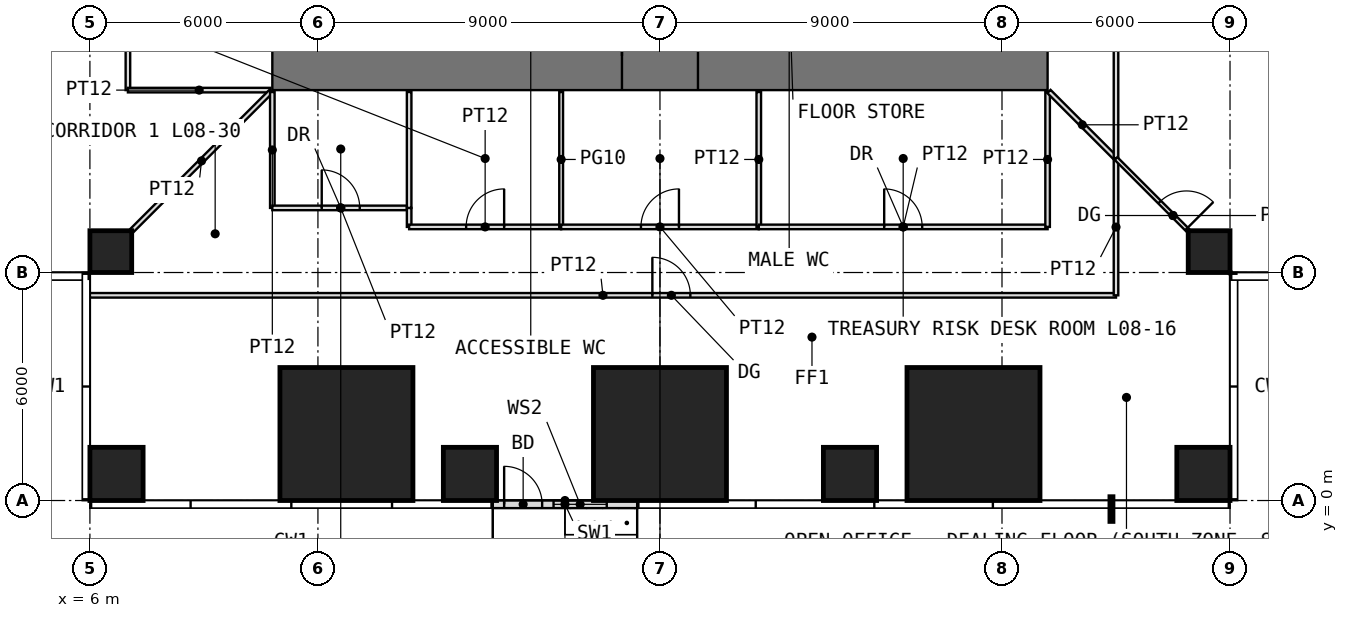
"""IFC4 building model, lengths in metres.
Left out: names, types, materials, properties, quantities, classifications, styles, units other than length and angle.
Written with IfcOpenShell. Run it as: python <this file> out.ifc"""

import sys

from ifc_helpers import new_model, si_unit, direction, frame, frame_2d, origin, origin_2d, place, context, subcontext, project, spatial, rectangle, extrude, element, fill, save


model = new_model("IFC4")
c1 = context("Model", 3, precision=1e-05, world=origin(), true_north=direction((0.0, 1.0)))
c2 = subcontext(c1, "Body", "Model", "MODEL_VIEW")
j1 = project(units=[si_unit("LENGTHUNIT", "METRE"), si_unit("PLANEANGLEUNIT", "RADIAN")], contexts=[c1])
p1 = place(None, origin())
s1 = spatial("IfcSite", under=j1, at=p1, CompositionType="ELEMENT")
p2 = place(p1, origin())
s2 = spatial("IfcBuilding", under=s1, at=p2, CompositionType="ELEMENT")
p3 = place(p2, frame((0.0, 0.0, 38.5)))
s3 = spatial("IfcBuildingStorey", under=s2, at=p3, CompositionType="ELEMENT", Elevation=38.5)
p4 = place(p3, frame((6.7, 0.7, 0.0), z_axis=(0.0, 0.0, 1.0), x_axis=(1.0, 0.0, 0.0)))
e1 = element("IfcColumn", 1, at=p4, inside=s3, PredefinedType="COLUMN", context=c2, shape_type="SweptSolid", body=[
    extrude(rectangle(XDim=1.4, YDim=1.4, at=origin_2d()), origin(), (0.0, 0.0, 1.0), 4.0),
])
p5 = place(p3, frame((12.75, 1.75, 0.0), z_axis=(0.0, 0.0, 1.0), x_axis=(1.0, 0.0, 0.0)))
e2 = element("IfcColumn", 2, at=p5, inside=s3, PredefinedType="COLUMN", context=c2, shape_type="SweptSolid", body=[
    extrude(rectangle(XDim=3.5, YDim=3.5, at=origin_2d()), origin(), (0.0, 0.0, 1.0), 4.0),
])
p6 = place(p3, frame((16.0, 0.7, 0.0), z_axis=(0.0, 0.0, 1.0), x_axis=(1.0, 0.0, 0.0)))
e3 = element("IfcColumn", 3, at=p6, inside=s3, PredefinedType="COLUMN", context=c2, shape_type="SweptSolid", body=[
    extrude(rectangle(XDim=1.4, YDim=1.4, at=origin_2d()), origin(), (0.0, 0.0, 1.0), 4.0),
])
p7 = place(p3, frame((21.0, 1.75, 0.0), z_axis=(0.0, 0.0, 1.0), x_axis=(1.0, 0.0, 0.0)))
e4 = element("IfcColumn", 4, at=p7, inside=s3, PredefinedType="COLUMN", context=c2, shape_type="SweptSolid", body=[
    extrude(rectangle(XDim=3.5, YDim=3.5, at=origin_2d()), origin(), (0.0, 0.0, 1.0), 4.0),
])
p8 = place(p3, frame((26.0, 0.7, 0.0), z_axis=(0.0, 0.0, 1.0), x_axis=(1.0, 0.0, 0.0)))
e5 = element("IfcColumn", 5, at=p8, inside=s3, PredefinedType="COLUMN", context=c2, shape_type="SweptSolid", body=[
    extrude(rectangle(XDim=1.4, YDim=1.4, at=origin_2d()), origin(), (0.0, 0.0, 1.0), 4.0),
])
p9 = place(p3, frame((29.25, 1.75, 0.0), z_axis=(0.0, 0.0, 1.0), x_axis=(1.0, 0.0, 0.0)))
e6 = element("IfcColumn", 6, at=p9, inside=s3, PredefinedType="COLUMN", context=c2, shape_type="SweptSolid", body=[
    extrude(rectangle(XDim=3.5, YDim=3.5, at=origin_2d()), origin(), (0.0, 0.0, 1.0), 4.0),
])
p10 = place(p3, frame((35.3, 0.7, 0.0), z_axis=(0.0, 0.0, 1.0), x_axis=(1.0, 0.0, 0.0)))
e7 = element("IfcColumn", 7, at=p10, inside=s3, PredefinedType="COLUMN", context=c2, shape_type="SweptSolid", body=[
    extrude(rectangle(XDim=1.4, YDim=1.4, at=origin_2d()), origin(), (0.0, 0.0, 1.0), 4.0),
])
for number, where, z_axis, x_axis in (
    (8, (6.55, 6.55, 0.0), (0.0, 0.0, 1.0), (1.0, 0.0, 0.0)),
    (9, (35.45, 6.55, 0.0), (0.0, 0.0, 1.0), (1.0, 0.0, 0.0)),
):
    element("IfcColumn", number, at=place(p3, frame(where, z_axis=z_axis, x_axis=x_axis)), inside=s3, PredefinedType="COLUMN", context=c2, shape_type="SweptSolid", body=[
        extrude(rectangle(XDim=1.1, YDim=1.1, at=origin_2d()), origin(), (0.0, 0.0, 1.0), 4.0),
    ])
p11 = place(p3, frame((16.6, -0.1, 0.0), z_axis=(0.0, 0.0, 1.0), x_axis=(1.0, 0.0, 0.0)))
e10 = element("IfcWall", 10, at=p11, inside=s3, PredefinedType="USERDEFINED", context=c2, shape_type="SweptSolid", body=[
    extrude(rectangle(XDim=3.8, YDim=0.2, at=frame_2d((1.9, 0.0))), origin(), (0.0, 0.0, 1.0), 3.75),
])
p12 = place(p11, frame((0.3, 0.0, 0.0)))
e11 = element("IfcOpeningElement", 11, at=p12, cuts=e10, PredefinedType="OPENING", context=c2, shape_type="SweptSolid", body=[
    extrude(rectangle(XDim=1.0, YDim=2.4, at=frame_2d((0.5, 1.2))), frame((0.0, 0.11, 0.0), z_axis=(0.0, -1.0, 0.0), x_axis=(1.0, 0.0, 0.0)), (0.0, 0.0, 1.0), 0.22),
])
p13 = place(p11, frame((1.6, 0.0, 0.3)))
e12 = element("IfcOpeningElement", 12, at=p13, cuts=e10, PredefinedType="OPENING", context=c2, shape_type="SweptSolid", body=[
    extrude(rectangle(XDim=1.4, YDim=2.7, at=frame_2d((0.7, 1.35))), frame((0.0, 0.11, 0.0), z_axis=(0.0, -1.0, 0.0), x_axis=(1.0, 0.0, 0.0)), (0.0, 0.0, 1.0), 0.22),
])
p14 = place(p3, frame((10.8, 11.7, -0.05), z_axis=(0.0, 0.0, 1.0), x_axis=(1.0, 0.0, 0.0)))
e13 = element("IfcWall", 13, at=p14, inside=s3, PredefinedType="SHEAR", context=c2, shape_type="SweptSolid", body=[
    extrude(rectangle(XDim=20.4, YDim=1.8, at=frame_2d((10.2, 0.0))), origin(), (0.0, 0.0, 1.0), 4.0),
])
p15 = place(p14, frame((9.2, 0.0, 0.05)))
e14 = element("IfcOpeningElement", 14, at=p15, cuts=e13, PredefinedType="OPENING", context=c2, shape_type="SweptSolid", body=[
    extrude(rectangle(XDim=2.0, YDim=2.2, at=frame_2d((1.0, 1.1))), frame((0.0, 0.91, 0.0), z_axis=(0.0, -1.0, 0.0), x_axis=(1.0, 0.0, 0.0)), (0.0, 0.0, 1.0), 1.82),
])
p16 = place(p3, frame((6.0, 5.4, 0.0), z_axis=(0.0, 0.0, 1.0), x_axis=(1.0, 0.0, 0.0)))
e15 = element("IfcWall", 15, at=p16, inside=s3, PredefinedType="PARTITIONING", context=c2, shape_type="SweptSolid", body=[
    extrude(rectangle(XDim=27.0, YDim=0.12, at=frame_2d((13.5, 0.0))), origin(), (0.0, 0.0, 1.0), 3.75),
])
p17 = place(p16, frame((14.8, 0.0, 0.0)))
e16 = element("IfcOpeningElement", 16, at=p17, cuts=e15, PredefinedType="OPENING", context=c2, shape_type="SweptSolid", body=[
    extrude(rectangle(XDim=1.0, YDim=2.4, at=frame_2d((0.5, 1.2))), frame((0.0, 0.07, 0.0), z_axis=(0.0, -1.0, 0.0), x_axis=(1.0, 0.0, 0.0)), (0.0, 0.0, 1.0), 0.14),
])
p18 = place(p3, frame((7.0, 10.8, 0.0), z_axis=(0.0, 0.0, 1.0), x_axis=(0.0, 1.0, 0.0)))
e17 = element("IfcWall", 17, at=p18, inside=s3, PredefinedType="PARTITIONING", context=c2, shape_type="SweptSolid", body=[
    extrude(rectangle(XDim=5.0, YDim=0.12, at=frame_2d((2.5, 0.0))), origin(), (0.0, 0.0, 1.0), 3.75),
])
p19 = place(p18, frame((2.0, 0.0, 0.0)))
e18 = element("IfcOpeningElement", 18, at=p19, cuts=e17, PredefinedType="OPENING", context=c2, shape_type="SweptSolid", body=[
    extrude(rectangle(XDim=1.0, YDim=2.2, at=frame_2d((0.5, 1.1))), frame((0.0, 0.07, 0.0), z_axis=(0.0, -1.0, 0.0), x_axis=(1.0, 0.0, 0.0)), (0.0, 0.0, 1.0), 0.14),
])
p20 = place(p3, frame((7.0, 10.8, 0.0), z_axis=(0.0, 0.0, 1.0), x_axis=(1.0, 0.0, 0.0)))
e19 = element("IfcWall", 19, at=p20, inside=s3, PredefinedType="PARTITIONING", context=c2, shape_type="SweptSolid", body=[
    extrude(rectangle(XDim=3.75, YDim=0.12, at=frame_2d((1.875, 0.0))), origin(), (0.0, 0.0, 1.0), 3.75),
])
p21 = place(p3, frame((7.11, 7.11, 0.0), z_axis=(0.0, 0.0, 1.0), x_axis=(0.707106781187, 0.707106781187, 0.0)))
e20 = element("IfcWall", 20, at=p21, inside=s3, PredefinedType="PARTITIONING", context=c2, shape_type="SweptSolid", body=[
    extrude(rectangle(XDim=5.168, YDim=0.12, at=frame_2d((2.584, 0.0))), origin(), (0.0, 0.0, 1.0), 3.75),
])
p22 = place(p3, frame((10.8, 7.7, 0.0), z_axis=(0.0, 0.0, 1.0), x_axis=(0.0, 1.0, 0.0)))
e21 = element("IfcWall", 21, at=p22, inside=s3, PredefinedType="PARTITIONING", context=c2, shape_type="SweptSolid", body=[
    extrude(rectangle(XDim=3.05, YDim=0.12, at=frame_2d((1.525, 0.0))), origin(), (0.0, 0.0, 1.0), 3.75),
])
p23 = place(p3, frame((10.8, 7.7, 0.0), z_axis=(0.0, 0.0, 1.0), x_axis=(1.0, 0.0, 0.0)))
e22 = element("IfcWall", 22, at=p23, inside=s3, PredefinedType="PARTITIONING", context=c2, shape_type="SweptSolid", body=[
    extrude(rectangle(XDim=3.6, YDim=0.12, at=frame_2d((1.8, 0.0))), origin(), (0.0, 0.0, 1.0), 3.75),
])
p24 = place(p23, frame((1.3, 0.0, 0.0)))
e23 = element("IfcOpeningElement", 23, at=p24, cuts=e22, PredefinedType="OPENING", context=c2, shape_type="SweptSolid", body=[
    extrude(rectangle(XDim=1.0, YDim=2.2, at=frame_2d((0.5, 1.1))), frame((0.0, 0.07, 0.0), z_axis=(0.0, -1.0, 0.0), x_axis=(1.0, 0.0, 0.0)), (0.0, 0.0, 1.0), 0.14),
])
p25 = place(p3, frame((14.4, 7.2, 0.0), z_axis=(0.0, 0.0, 1.0), x_axis=(0.0, 1.0, 0.0)))
e24 = element("IfcWall", 24, at=p25, inside=s3, PredefinedType="PARTITIONING", context=c2, shape_type="SweptSolid", body=[
    extrude(rectangle(XDim=0.5, YDim=0.12, at=frame_2d((0.25, 0.0))), origin(), (0.0, 0.0, 1.0), 3.75),
])
p26 = place(p3, frame((14.4, 7.2, 0.0), z_axis=(0.0, 0.0, 1.0), x_axis=(1.0, 0.0, 0.0)))
e25 = element("IfcWall", 25, at=p26, inside=s3, PredefinedType="PARTITIONING", context=c2, shape_type="SweptSolid", body=[
    extrude(rectangle(XDim=4.0, YDim=0.12, at=frame_2d((2.0, 0.0))), origin(), (0.0, 0.0, 1.0), 3.75),
])
p27 = place(p26, frame((1.5, 0.0, 0.0)))
e26 = element("IfcOpeningElement", 26, at=p27, cuts=e25, PredefinedType="OPENING", context=c2, shape_type="SweptSolid", body=[
    extrude(rectangle(XDim=1.0, YDim=2.4, at=frame_2d((0.5, 1.2))), frame((0.0, 0.07, 0.0), z_axis=(0.0, -1.0, 0.0), x_axis=(1.0, 0.0, 0.0)), (0.0, 0.0, 1.0), 0.14),
])
p28 = place(p3, frame((14.4, 7.7, 0.0), z_axis=(0.0, 0.0, 1.0), x_axis=(0.0, 1.0, 0.0)))
e27 = element("IfcWall", 27, at=p28, inside=s3, PredefinedType="PARTITIONING", context=c2, shape_type="SweptSolid", body=[
    extrude(rectangle(XDim=3.05, YDim=0.12, at=frame_2d((1.525, 0.0))), origin(), (0.0, 0.0, 1.0), 3.75),
])
p29 = place(p3, frame((18.4, 7.2, 0.0), z_axis=(0.0, 0.0, 1.0), x_axis=(0.0, 1.0, 0.0)))
e28 = element("IfcWall", 28, at=p29, inside=s3, PredefinedType="PARTITIONING", context=c2, shape_type="SweptSolid", body=[
    extrude(rectangle(XDim=3.55, YDim=0.1, at=frame_2d((1.775, 0.0))), origin(), (0.0, 0.0, 1.0), 3.75),
])
p30 = place(p3, frame((18.4, 7.2, 0.0), z_axis=(0.0, 0.0, 1.0), x_axis=(1.0, 0.0, 0.0)))
e29 = element("IfcWall", 29, at=p30, inside=s3, PredefinedType="PARTITIONING", context=c2, shape_type="SweptSolid", body=[
    extrude(rectangle(XDim=5.2, YDim=0.12, at=frame_2d((2.6, 0.0))), origin(), (0.0, 0.0, 1.0), 3.75),
])
p31 = place(p30, frame((2.1, 0.0, 0.0)))
e30 = element("IfcOpeningElement", 30, at=p31, cuts=e29, PredefinedType="OPENING", context=c2, shape_type="SweptSolid", body=[
    extrude(rectangle(XDim=1.0, YDim=2.4, at=frame_2d((0.5, 1.2))), frame((0.0, 0.07, 0.0), z_axis=(0.0, -1.0, 0.0), x_axis=(1.0, 0.0, 0.0)), (0.0, 0.0, 1.0), 0.14),
])
p32 = place(p3, frame((23.6, 7.2, 0.0), z_axis=(0.0, 0.0, 1.0), x_axis=(0.0, 1.0, 0.0)))
e31 = element("IfcWall", 31, at=p32, inside=s3, PredefinedType="PARTITIONING", context=c2, shape_type="SweptSolid", body=[
    extrude(rectangle(XDim=3.55, YDim=0.12, at=frame_2d((1.775, 0.0))), origin(), (0.0, 0.0, 1.0), 3.75),
])
p33 = place(p3, frame((23.6, 7.2, 0.0), z_axis=(0.0, 0.0, 1.0), x_axis=(1.0, 0.0, 0.0)))
e32 = element("IfcWall", 32, at=p33, inside=s3, PredefinedType="PARTITIONING", context=c2, shape_type="SweptSolid", body=[
    extrude(rectangle(XDim=7.6, YDim=0.12, at=frame_2d((3.8, 0.0))), origin(), (0.0, 0.0, 1.0), 3.75),
])
p34 = place(p33, frame((3.3, 0.0, 0.0)))
e33 = element("IfcOpeningElement", 33, at=p34, cuts=e32, PredefinedType="OPENING", context=c2, shape_type="SweptSolid", body=[
    extrude(rectangle(XDim=1.0, YDim=2.2, at=frame_2d((0.5, 1.1))), frame((0.0, 0.07, 0.0), z_axis=(0.0, -1.0, 0.0), x_axis=(1.0, 0.0, 0.0)), (0.0, 0.0, 1.0), 0.14),
])
p35 = place(p3, frame((31.2, 7.2, 0.0), z_axis=(0.0, 0.0, 1.0), x_axis=(0.0, 1.0, 0.0)))
e34 = element("IfcWall", 34, at=p35, inside=s3, PredefinedType="PARTITIONING", context=c2, shape_type="SweptSolid", body=[
    extrude(rectangle(XDim=3.55, YDim=0.12, at=frame_2d((1.775, 0.0))), origin(), (0.0, 0.0, 1.0), 3.75),
])
p36 = place(p3, frame((31.235, 10.765, 0.0), z_axis=(0.0, 0.0, 1.0), x_axis=(0.707106781187, -0.707106781187, 0.0)))
e35 = element("IfcWall", 35, at=p36, inside=s3, PredefinedType="PARTITIONING", context=c2, shape_type="SweptSolid", body=[
    extrude(rectangle(XDim=2.481, YDim=0.12, at=frame_2d((1.241, 0.0))), origin(), (0.0, 0.0, 1.0), 3.75),
])
p37 = place(p3, frame((33.0, 5.4, 0.0), z_axis=(0.0, 0.0, 1.0), x_axis=(0.0, 1.0, 0.0)))
e36 = element("IfcWall", 36, at=p37, inside=s3, PredefinedType="PARTITIONING", context=c2, shape_type="SweptSolid", body=[
    extrude(rectangle(XDim=3.59, YDim=0.12, at=frame_2d((1.795, 0.0))), origin(), (0.0, 0.0, 1.0), 3.75),
])
p38 = place(p3, frame((33.0, 9.01, 0.0), z_axis=(0.0, 0.0, 1.0), x_axis=(0.0, 1.0, 0.0)))
e37 = element("IfcWall", 37, at=p38, inside=s3, PredefinedType="PARTITIONING", context=c2, shape_type="SweptSolid", body=[
    extrude(rectangle(XDim=23.98, YDim=0.12, at=frame_2d((11.99, 0.0))), origin(), (0.0, 0.0, 1.0), 3.75),
])
p39 = place(p38, frame((11.49, 0.0, 0.0)))
e38 = element("IfcOpeningElement", 38, at=p39, cuts=e37, PredefinedType="OPENING", context=c2, shape_type="SweptSolid", body=[
    extrude(rectangle(XDim=1.0, YDim=2.4, at=frame_2d((0.5, 1.2))), frame((0.0, 0.07, 0.0), z_axis=(0.0, -1.0, 0.0), x_axis=(1.0, 0.0, 0.0)), (0.0, 0.0, 1.0), 0.14),
])
p40 = place(p3, frame((33.0, 9.0, 0.0), z_axis=(0.0, 0.0, 1.0), x_axis=(0.707106781187, -0.707106781187, 0.0)))
e39 = element("IfcWall", 39, at=p40, inside=s3, PredefinedType="PARTITIONING", context=c2, shape_type="SweptSolid", body=[
    extrude(rectangle(XDim=4.243, YDim=0.1, at=frame_2d((2.121, 0.0))), origin(), (0.0, 0.0, 1.0), 3.75),
])
p41 = place(p40, frame((1.621, 0.0, 0.0)))
e40 = element("IfcOpeningElement", 40, at=p41, cuts=e39, PredefinedType="OPENING", context=c2, shape_type="SweptSolid", body=[
    extrude(rectangle(XDim=1.0, YDim=2.4, at=frame_2d((0.5, 1.2))), frame((0.0, 0.06, 0.0), z_axis=(0.0, -1.0, 0.0), x_axis=(1.0, 0.0, 0.0)), (0.0, 0.0, 1.0), 0.12),
])
p42 = place(p12, origin())
e41 = element("IfcDoor", 41, at=p42, inside=s3, OperationType="SINGLE_SWING_LEFT", PredefinedType="DOOR", context=c2, shape_type="SweptSolid", body=[
    extrude(rectangle(XDim=1.0, YDim=2.4, at=frame_2d((0.5, 1.2))), frame((0.0, 0.025, 0.0), z_axis=(0.0, -1.0, 0.0), x_axis=(1.0, 0.0, 0.0)), (0.0, 0.0, 1.0), 0.05),
])
fill(e11, e41)
p43 = place(p13, origin())
e42 = element("IfcWindow", 42, at=p43, inside=s3, PartitioningType="SINGLE_PANEL", PredefinedType="WINDOW", context=c2, shape_type="SweptSolid", body=[
    extrude(rectangle(XDim=1.4, YDim=2.7, at=frame_2d((0.7, 1.35))), frame((0.0, 0.03, 0.0), z_axis=(0.0, -1.0, 0.0), x_axis=(1.0, 0.0, 0.0)), (0.0, 0.0, 1.0), 0.06),
])
fill(e12, e42)
p44 = place(p15, origin())
e43 = element("IfcDoor", 43, at=p44, inside=s3, OperationType="DOUBLE_DOOR_SINGLE_SWING", PredefinedType="DOOR", context=c2, shape_type="SweptSolid", body=[
    extrude(rectangle(XDim=2.0, YDim=2.2, at=frame_2d((1.0, 1.1))), frame((0.0, 0.025, 0.0), z_axis=(0.0, -1.0, 0.0), x_axis=(1.0, 0.0, 0.0)), (0.0, 0.0, 1.0), 0.05),
])
fill(e14, e43)
p45 = place(p24, origin())
e44 = element("IfcDoor", 44, at=p45, inside=s3, OperationType="SINGLE_SWING_LEFT", PredefinedType="DOOR", context=c2, shape_type="SweptSolid", body=[
    extrude(rectangle(XDim=1.0, YDim=2.2, at=frame_2d((0.5, 1.1))), frame((0.0, 0.025, 0.0), z_axis=(0.0, -1.0, 0.0), x_axis=(1.0, 0.0, 0.0)), (0.0, 0.0, 1.0), 0.05),
])
fill(e23, e44)
p46 = place(p27, origin())
e45 = element("IfcDoor", 45, at=p46, inside=s3, OperationType="SINGLE_SWING_RIGHT", PredefinedType="DOOR", context=c2, shape_type="SweptSolid", body=[
    extrude(rectangle(XDim=1.0, YDim=2.4, at=frame_2d((0.5, 1.2))), frame((0.0, 0.025, 0.0), z_axis=(0.0, -1.0, 0.0), x_axis=(1.0, 0.0, 0.0)), (0.0, 0.0, 1.0), 0.05),
])
fill(e26, e45)
p47 = place(p34, origin())
e46 = element("IfcDoor", 46, at=p47, inside=s3, OperationType="SINGLE_SWING_LEFT", PredefinedType="DOOR", context=c2, shape_type="SweptSolid", body=[
    extrude(rectangle(XDim=1.0, YDim=2.2, at=frame_2d((0.5, 1.1))), frame((0.0, 0.025, 0.0), z_axis=(0.0, -1.0, 0.0), x_axis=(1.0, 0.0, 0.0)), (0.0, 0.0, 1.0), 0.05),
])
fill(e33, e46)
p48 = place(p17, origin())
e47 = element("IfcDoor", 47, at=p48, inside=s3, OperationType="SINGLE_SWING_LEFT", PredefinedType="DOOR", context=c2, shape_type="SweptSolid", body=[
    extrude(rectangle(XDim=1.0, YDim=2.4, at=frame_2d((0.5, 1.2))), frame((0.0, 0.025, 0.0), z_axis=(0.0, -1.0, 0.0), x_axis=(1.0, 0.0, 0.0)), (0.0, 0.0, 1.0), 0.05),
])
fill(e16, e47)
p49 = place(p31, origin())
e48 = element("IfcDoor", 48, at=p49, inside=s3, OperationType="SINGLE_SWING_RIGHT", PredefinedType="DOOR", context=c2, shape_type="SweptSolid", body=[
    extrude(rectangle(XDim=1.0, YDim=2.4, at=frame_2d((0.5, 1.2))), frame((0.0, 0.025, 0.0), z_axis=(0.0, -1.0, 0.0), x_axis=(1.0, 0.0, 0.0)), (0.0, 0.0, 1.0), 0.05),
])
fill(e30, e48)
p50 = place(p41, origin())
e49 = element("IfcDoor", 49, at=p50, inside=s3, OperationType="SINGLE_SWING_RIGHT", PredefinedType="DOOR", context=c2, shape_type="SweptSolid", body=[
    extrude(rectangle(XDim=1.0, YDim=2.4, at=frame_2d((0.5, 1.2))), frame((0.0, 0.025, 0.0), z_axis=(0.0, -1.0, 0.0), x_axis=(1.0, 0.0, 0.0)), (0.0, 0.0, 1.0), 0.05),
])
fill(e40, e49)
save(model, sys.argv[1])
